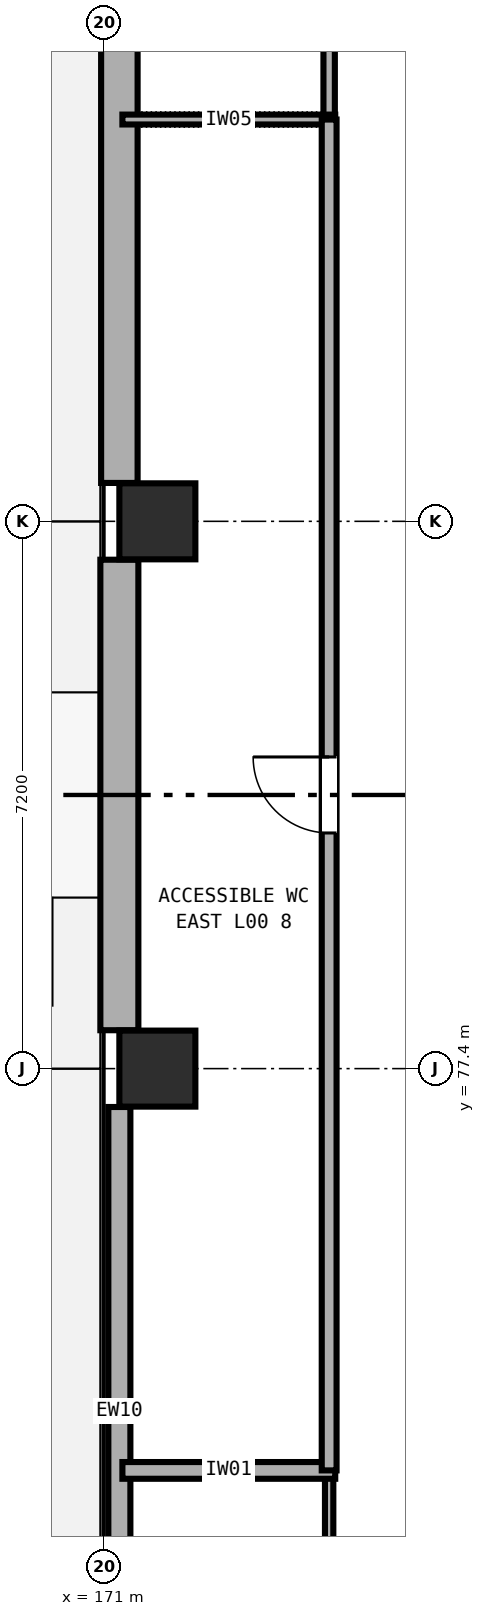
"""IFC4 building model, lengths in metres.
Left out: names, types, materials, properties, quantities, classifications, styles, units other than length and angle.
Written with IfcOpenShell. Run it as: python <this file> out.ifc"""

import sys

from ifc_helpers import new_model, si_unit, direction, frame, frame_2d, origin, origin_2d, place, context, subcontext, project, spatial, rectangle, extrude, element, fill, save


model = new_model("IFC4")
c1 = context("Model", 3, precision=1e-05, world=origin(), true_north=direction((0.0, 1.0)))
c2 = subcontext(c1, "Body", "Model", "MODEL_VIEW")
j1 = project(units=[si_unit("LENGTHUNIT", "METRE"), si_unit("PLANEANGLEUNIT", "RADIAN")], contexts=[c1])
p1 = place(None, origin())
s1 = spatial("IfcSite", under=j1, at=p1, CompositionType="ELEMENT")
p2 = place(p1, origin())
s2 = spatial("IfcBuilding", under=s1, at=p2, CompositionType="ELEMENT")
p3 = place(p2, origin())
s3 = spatial("IfcBuildingStorey", under=s2, at=p3, CompositionType="ELEMENT", Elevation=0.0)
for number, where, z_axis, x_axis in (
    (1, (171.7, 77.4, 0.0), (0.0, 0.0, 1.0), (1.0, 0.0, 0.0)),
    (2, (171.7, 84.6, 0.0), (0.0, 0.0, 1.0), (1.0, 0.0, 0.0)),
):
    element("IfcColumn", number, at=place(p3, frame(where, z_axis=z_axis, x_axis=x_axis)), inside=s3, PredefinedType="COLUMN", context=c2, shape_type="SweptSolid", body=[
        extrude(rectangle(XDim=1.0, YDim=1.0, at=origin_2d()), origin(), (0.0, 0.0, 1.0), 4.8),
    ])
p4 = place(p3, frame((171.2, 68.905, 0.0), z_axis=(0.0, 0.0, 1.0), x_axis=(0.0, 1.0, 0.0)))
e3 = element("IfcWall", 3, at=p4, inside=s3, PredefinedType="SOLIDWALL", context=c2, shape_type="SweptSolid", body=[
    extrude(rectangle(XDim=7.99, YDim=0.29, at=frame_2d((3.995, 0.0))), origin(), (0.0, 0.0, 1.0), 3.28),
])
p5 = place(p3, frame((171.2, 77.905, 0.0), z_axis=(0.0, 0.0, 1.0), x_axis=(0.0, 1.0, 0.0)))
e4 = element("IfcWall", 4, at=p5, inside=s3, PredefinedType="SOLIDWALL", context=c2, shape_type="SweptSolid", body=[
    extrude(rectangle(XDim=6.19, YDim=0.5, at=frame_2d((3.095, 0.0))), origin(), (0.0, 0.0, 1.0), 3.28),
])
p6 = place(p3, frame((171.2, 85.105, 0.0), z_axis=(0.0, 0.0, 1.0), x_axis=(0.0, 1.0, 0.0)))
e5 = element("IfcWall", 5, at=p6, inside=s3, PredefinedType="SOLIDWALL", context=c2, shape_type="SweptSolid", body=[
    extrude(rectangle(XDim=7.99, YDim=0.48, at=frame_2d((3.995, 0.0))), origin(), (0.0, 0.0, 1.0), 3.28),
])
p7 = place(p3, frame((173.96, 89.886, 0.0), z_axis=(0.0, 0.0, 1.0), x_axis=(0.0, 1.0, 0.0)))
e6 = element("IfcWall", 6, at=p7, inside=s3, PredefinedType="PARTITIONING", context=c2, shape_type="SweptSolid", body=[
    extrude(rectangle(XDim=17.772, YDim=0.15, at=frame_2d((8.886, 0.0))), origin(), (0.0, 0.0, 1.0), 3.28),
])
p8 = place(p7, frame((8.336, 0.0, 0.0)))
e7 = element("IfcOpeningElement", 7, at=p8, cuts=e6, PredefinedType="OPENING", context=c2, shape_type="SweptSolid", body=[
    extrude(rectangle(XDim=1.1, YDim=2.1, at=frame_2d((0.55, 1.05))), frame((0.0, 0.085, 0.0), z_axis=(0.0, -1.0, 0.0), x_axis=(1.0, 0.0, 0.0)), (0.0, 0.0, 1.0), 0.17),
])
p9 = place(p3, frame((174.04, 89.886, 0.0), z_axis=(0.0, 0.0, 1.0), x_axis=(-1.0, 0.0, 0.0)))
e8 = element("IfcWall", 8, at=p9, inside=s3, PredefinedType="PARTITIONING", context=c2, shape_type="SweptSolid", body=[
    extrude(rectangle(XDim=2.8, YDim=0.13, at=frame_2d((1.4, 0.0))), origin(), (0.0, 0.0, 1.0), 3.28),
])
p10 = place(p3, frame((173.96, 54.342, 0.0), z_axis=(0.0, 0.0, 1.0), x_axis=(0.0, 1.0, 0.0)))
e9 = element("IfcWall", 9, at=p10, inside=s3, PredefinedType="PARTITIONING", context=c2, shape_type="SweptSolid", body=[
    extrude(rectangle(XDim=17.772, YDim=0.11, at=frame_2d((8.886, 0.0))), origin(), (0.0, 0.0, 1.0), 3.28),
])
p11 = place(p10, frame((8.361, 0.0, 0.0)))
e10 = element("IfcOpeningElement", 10, at=p11, cuts=e9, PredefinedType="OPENING", context=c2, shape_type="SweptSolid", body=[
    extrude(rectangle(XDim=1.05, YDim=2.1, at=frame_2d((0.525, 1.05))), frame((0.0, 0.065, 0.0), z_axis=(0.0, -1.0, 0.0), x_axis=(1.0, 0.0, 0.0)), (0.0, 0.0, 1.0), 0.13),
])
p12 = place(p3, frame((171.24, 72.114, 0.0), z_axis=(0.0, 0.0, 1.0), x_axis=(1.0, 0.0, 0.0)))
e11 = element("IfcWall", 11, at=p12, inside=s3, PredefinedType="PARTITIONING", context=c2, shape_type="SweptSolid", body=[
    extrude(rectangle(XDim=2.8, YDim=0.22, at=frame_2d((1.4, 0.0))), origin(), (0.0, 0.0, 1.0), 3.28),
])
p13 = place(p3, frame((173.96, 72.114, 0.0), z_axis=(0.0, 0.0, 1.0), x_axis=(0.0, 1.0, 0.0)))
e12 = element("IfcWall", 12, at=p13, inside=s3, PredefinedType="PARTITIONING", context=c2, shape_type="SweptSolid", body=[
    extrude(rectangle(XDim=17.772, YDim=0.195, at=frame_2d((8.886, 0.0))), origin(), (0.0, 0.0, 1.0), 3.28),
])
p14 = place(p13, frame((8.386, 0.0, 0.0)))
e13 = element("IfcOpeningElement", 13, at=p14, cuts=e12, PredefinedType="OPENING", context=c2, shape_type="SweptSolid", body=[
    extrude(rectangle(XDim=1.0, YDim=2.1, at=frame_2d((0.5, 1.05))), frame((0.0, 0.107, 0.0), z_axis=(0.0, -1.0, 0.0), x_axis=(1.0, 0.0, 0.0)), (0.0, 0.0, 1.0), 0.215),
])
p15 = place(p14, origin())
e14 = element("IfcDoor", 14, at=p15, inside=s3, OperationType="SINGLE_SWING_RIGHT", PredefinedType="DOOR", context=c2, shape_type="SweptSolid", body=[
    extrude(rectangle(XDim=1.0, YDim=2.1, at=frame_2d((0.5, 1.05))), frame((0.0, 0.025, 0.0), z_axis=(0.0, -1.0, 0.0), x_axis=(1.0, 0.0, 0.0)), (0.0, 0.0, 1.0), 0.05),
])
fill(e13, e14)
save(model, sys.argv[1])
